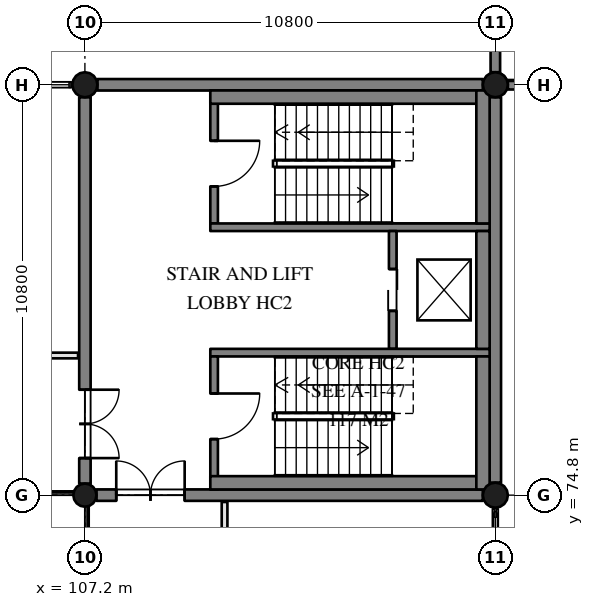
"""IFC4 building model, lengths in metres.
Left out: names, types, materials, properties, quantities, classifications, styles, units other than length and angle.
Written with IfcOpenShell. Run it as: python <this file> out.ifc"""

import sys

from ifc_helpers import new_model, si_unit, direction, frame, frame_2d, origin, origin_2d, place, context, subcontext, project, spatial, rectangle, hollow_circle, extrude, element, fill, save


model = new_model("IFC4")
c1 = context("Model", 3, precision=1e-05, world=origin(), true_north=direction((0.0, 1.0)))
c2 = subcontext(c1, "Body", "Model", "MODEL_VIEW")
j1 = project(units=[si_unit("LENGTHUNIT", "METRE"), si_unit("PLANEANGLEUNIT", "RADIAN")], contexts=[c1])
p1 = place(None, origin())
s1 = spatial("IfcSite", under=j1, at=p1, CompositionType="ELEMENT")
p2 = place(p1, origin())
s2 = spatial("IfcBuilding", under=s1, at=p2, CompositionType="ELEMENT")
p3 = place(p2, frame((0.0, 0.0, 4.8)))
s3 = spatial("IfcBuildingStorey", under=s2, at=p3, CompositionType="ELEMENT", Elevation=4.8)
p4 = place(p3, frame((107.2, 74.8, 0.0), z_axis=(0.0, 0.0, 1.0), x_axis=(1.0, 0.0, 0.0)))
e1 = element("IfcColumn", 1, at=p4, inside=s3, PredefinedType="COLUMN", context=c2, shape_type="SweptSolid", body=[
    extrude(hollow_circle(Radius=0.305, WallThickness=0.025, at=origin_2d()), origin(), (0.0, 0.0, 1.0), 3.9),
])
for number, where, z_axis, x_axis in (
    (2, (107.2, 85.6, 0.0), (0.0, 0.0, 1.0), (1.0, 0.0, 0.0)),
    (3, (118.0, 74.8, 0.0), (0.0, 0.0, 1.0), (1.0, 0.0, 0.0)),
    (4, (118.0, 85.6, 0.0), (0.0, 0.0, 1.0), (1.0, 0.0, 0.0)),
):
    element("IfcColumn", number, at=place(p3, frame(where, z_axis=z_axis, x_axis=x_axis)), inside=s3, PredefinedType="COLUMN", context=c2, shape_type="SweptSolid", body=[
        extrude(hollow_circle(Radius=0.33, WallThickness=0.025, at=origin_2d()), origin(), (0.0, 0.0, 1.0), 3.9),
    ])
p5 = place(p3, frame((107.505, 74.8, 0.0), z_axis=(0.0, 0.0, 1.0), x_axis=(1.0, 0.0, 0.0)))
e5 = element("IfcWall", 5, at=p5, inside=s3, PredefinedType="SOLIDWALL", context=c2, shape_type="SweptSolid", body=[
    extrude(rectangle(XDim=10.165, YDim=0.3, at=frame_2d((5.083, 0.0))), origin(), (0.0, 0.0, 1.0), 3.9),
])
p6 = place(p5, frame((0.52, 0.0, 0.0)))
e6 = element("IfcOpeningElement", 6, at=p6, cuts=e5, PredefinedType="OPENING", context=c2, shape_type="SweptSolid", body=[
    extrude(rectangle(XDim=1.8, YDim=2.1, at=frame_2d((0.9, 1.05))), frame((0.0, 0.16, 0.0), z_axis=(0.0, -1.0, 0.0), x_axis=(1.0, 0.0, 0.0)), (0.0, 0.0, 1.0), 0.32),
])
p7 = place(p3, frame((118.0, 75.13, 0.0), z_axis=(0.0, 0.0, 1.0), x_axis=(0.0, 1.0, 0.0)))
e7 = element("IfcWall", 7, at=p7, inside=s3, PredefinedType="SOLIDWALL", context=c2, shape_type="SweptSolid", body=[
    extrude(rectangle(XDim=10.14, YDim=0.3, at=frame_2d((5.07, 0.0))), origin(), (0.0, 0.0, 1.0), 3.9),
])
p8 = place(p3, frame((117.67, 85.6, 0.0), z_axis=(0.0, 0.0, 1.0), x_axis=(-1.0, 0.0, 0.0)))
e8 = element("IfcWall", 8, at=p8, inside=s3, PredefinedType="SOLIDWALL", context=c2, shape_type="SweptSolid", body=[
    extrude(rectangle(XDim=10.14, YDim=0.3, at=frame_2d((5.07, 0.0))), origin(), (0.0, 0.0, 1.0), 3.9),
])
p9 = place(p3, frame((107.2, 85.27, 0.0), z_axis=(0.0, 0.0, 1.0), x_axis=(0.0, -1.0, 0.0)))
e9 = element("IfcWall", 9, at=p9, inside=s3, PredefinedType="SOLIDWALL", context=c2, shape_type="SweptSolid", body=[
    extrude(rectangle(XDim=10.165, YDim=0.3, at=frame_2d((5.083, 0.0))), origin(), (0.0, 0.0, 1.0), 3.9),
])
p10 = place(p9, frame((7.695, 0.0, 0.0)))
e10 = element("IfcOpeningElement", 10, at=p10, cuts=e9, PredefinedType="OPENING", context=c2, shape_type="SweptSolid", body=[
    extrude(rectangle(XDim=1.8, YDim=2.1, at=frame_2d((0.9, 1.05))), frame((0.0, 0.16, 0.0), z_axis=(0.0, -1.0, 0.0), x_axis=(1.0, 0.0, 0.0)), (0.0, 0.0, 1.0), 0.32),
])
p11 = place(p3, frame((118.33, 85.6, 0.0), z_axis=(0.0, 0.0, 1.0), x_axis=(1.0, 0.0, 0.0)))
e11 = element("IfcWall", 11, at=p11, inside=s3, PredefinedType="SOLIDWALL", context=c2, shape_type="SweptSolid", body=[
    extrude(rectangle(XDim=10.595, YDim=0.25, at=frame_2d((5.297, 0.0))), origin(), (0.0, 0.0, 1.0), 3.9),
])
p12 = place(p3, frame((118.0, 96.0, 0.0), z_axis=(0.0, 0.0, 1.0), x_axis=(0.0, -1.0, 0.0)))
e12 = element("IfcWall", 12, at=p12, inside=s3, PredefinedType="SOLIDWALL", context=c2, shape_type="SweptSolid", body=[
    extrude(rectangle(XDim=10.07, YDim=0.25, at=frame_2d((5.035, 0.0))), origin(), (0.0, 0.0, 1.0), 3.9),
])
p13 = place(p12, frame((4.1, 0.0, 0.0)))
e13 = element("IfcOpeningElement", 13, at=p13, cuts=e12, PredefinedType="OPENING", context=c2, shape_type="SweptSolid", body=[
    extrude(rectangle(XDim=1.8, YDim=2.1, at=frame_2d((0.9, 1.05))), frame((0.0, 0.135, 0.0), z_axis=(0.0, -1.0, 0.0), x_axis=(1.0, 0.0, 0.0)), (0.0, 0.0, 1.0), 0.27),
])
p14 = place(p3, frame((110.6, 85.45, 0.0), z_axis=(0.0, 0.0, 1.0), x_axis=(0.0, -1.0, 0.0)))
e14 = element("IfcWall", 14, at=p14, inside=s3, PredefinedType="SOLIDWALL", context=c2, shape_type="SweptSolid", body=[
    extrude(rectangle(XDim=3.5, YDim=0.2, at=frame_2d((1.75, 0.0))), origin(), (0.0, 0.0, 1.0), 3.6),
])
p15 = place(p14, frame((1.325, 0.0, 0.0)))
e15 = element("IfcOpeningElement", 15, at=p15, cuts=e14, PredefinedType="OPENING", context=c2, shape_type="SweptSolid", body=[
    extrude(rectangle(XDim=1.2, YDim=2.1, at=frame_2d((0.6, 1.05))), frame((0.0, 0.11, 0.0), z_axis=(0.0, -1.0, 0.0), x_axis=(1.0, 0.0, 0.0)), (0.0, 0.0, 1.0), 0.22),
])
p16 = place(p3, frame((110.5, 81.85, 0.0), z_axis=(0.0, 0.0, 1.0), x_axis=(1.0, 0.0, 0.0)))
e16 = element("IfcWall", 16, at=p16, inside=s3, PredefinedType="SOLIDWALL", context=c2, shape_type="SweptSolid", body=[
    extrude(rectangle(XDim=7.35, YDim=0.2, at=frame_2d((3.675, 0.0))), origin(), (0.0, 0.0, 1.0), 3.6),
])
p17 = place(p3, frame((115.3, 81.75, 0.0), z_axis=(0.0, 0.0, 1.0), x_axis=(0.0, -1.0, 0.0)))
e17 = element("IfcWall", 17, at=p17, inside=s3, PredefinedType="SOLIDWALL", context=c2, shape_type="SweptSolid", body=[
    extrude(rectangle(XDim=3.1, YDim=0.2, at=frame_2d((1.55, 0.0))), origin(), (0.0, 0.0, 1.0), 3.6),
])
p18 = place(p17, frame((1.0, 0.0, 0.0)))
e18 = element("IfcOpeningElement", 18, at=p18, cuts=e17, PredefinedType="OPENING", context=c2, shape_type="SweptSolid", body=[
    extrude(rectangle(XDim=1.1, YDim=2.1, at=frame_2d((0.55, 1.05))), frame((0.0, 0.11, 0.0), z_axis=(0.0, -1.0, 0.0), x_axis=(1.0, 0.0, 0.0)), (0.0, 0.0, 1.0), 0.22),
])
p19 = place(p3, frame((110.5, 78.55, 0.0), z_axis=(0.0, 0.0, 1.0), x_axis=(1.0, 0.0, 0.0)))
e19 = element("IfcWall", 19, at=p19, inside=s3, PredefinedType="SOLIDWALL", context=c2, shape_type="SweptSolid", body=[
    extrude(rectangle(XDim=7.35, YDim=0.2, at=frame_2d((3.675, 0.0))), origin(), (0.0, 0.0, 1.0), 3.6),
])
p20 = place(p3, frame((110.6, 78.45, 0.0), z_axis=(0.0, 0.0, 1.0), x_axis=(0.0, -1.0, 0.0)))
e20 = element("IfcWall", 20, at=p20, inside=s3, PredefinedType="SOLIDWALL", context=c2, shape_type="SweptSolid", body=[
    extrude(rectangle(XDim=3.5, YDim=0.2, at=frame_2d((1.75, 0.0))), origin(), (0.0, 0.0, 1.0), 3.6),
])
p21 = place(p20, frame((0.975, 0.0, 0.0)))
e21 = element("IfcOpeningElement", 21, at=p21, cuts=e20, PredefinedType="OPENING", context=c2, shape_type="SweptSolid", body=[
    extrude(rectangle(XDim=1.2, YDim=2.1, at=frame_2d((0.6, 1.05))), frame((0.0, 0.11, 0.0), z_axis=(0.0, -1.0, 0.0), x_axis=(1.0, 0.0, 0.0)), (0.0, 0.0, 1.0), 0.22),
])
p22 = place(p3, frame((110.5, 85.275, -0.4), z_axis=(0.0, 0.0, 1.0), x_axis=(1.0, 0.0, 0.0)))
e22 = element("IfcWall", 22, at=p22, inside=s3, PredefinedType="SOLIDWALL", context=c2, shape_type="SweptSolid", body=[
    extrude(rectangle(XDim=7.35, YDim=0.35, at=frame_2d((3.675, 0.0))), origin(), (0.0, 0.0, 1.0), 4.0),
])
p23 = place(p3, frame((117.675, 85.45, -0.4), z_axis=(0.0, 0.0, 1.0), x_axis=(0.0, -1.0, 0.0)))
e23 = element("IfcWall", 23, at=p23, inside=s3, PredefinedType="SOLIDWALL", context=c2, shape_type="SweptSolid", body=[
    extrude(rectangle(XDim=3.5, YDim=0.35, at=frame_2d((1.75, 0.0))), origin(), (0.0, 0.0, 1.0), 4.0),
])
p24 = place(p3, frame((110.5, 75.125, -0.4), z_axis=(0.0, 0.0, 1.0), x_axis=(1.0, 0.0, 0.0)))
e24 = element("IfcWall", 24, at=p24, inside=s3, PredefinedType="SOLIDWALL", context=c2, shape_type="SweptSolid", body=[
    extrude(rectangle(XDim=7.35, YDim=0.35, at=frame_2d((3.675, 0.0))), origin(), (0.0, 0.0, 1.0), 4.0),
])
p25 = place(p3, frame((117.675, 78.45, -0.4), z_axis=(0.0, 0.0, 1.0), x_axis=(0.0, -1.0, 0.0)))
e25 = element("IfcWall", 25, at=p25, inside=s3, PredefinedType="SOLIDWALL", context=c2, shape_type="SweptSolid", body=[
    extrude(rectangle(XDim=3.5, YDim=0.35, at=frame_2d((1.75, 0.0))), origin(), (0.0, 0.0, 1.0), 4.0),
])
p26 = place(p3, frame((117.675, 81.75, -0.4), z_axis=(0.0, 0.0, 1.0), x_axis=(0.0, -1.0, 0.0)))
e26 = element("IfcWall", 26, at=p26, inside=s3, PredefinedType="SOLIDWALL", context=c2, shape_type="SweptSolid", body=[
    extrude(rectangle(XDim=3.1, YDim=0.35, at=frame_2d((1.55, 0.0))), origin(), (0.0, 0.0, 1.0), 4.0),
])
p27 = place(p3, frame((96.4, 78.475, 0.0), z_axis=(0.0, 0.0, 1.0), x_axis=(1.0, 0.0, 0.0)))
e27 = element("IfcWall", 27, at=p27, inside=s3, PredefinedType="PARTITIONING", context=c2, shape_type="SweptSolid", body=[
    extrude(rectangle(XDim=10.62, YDim=0.15, at=frame_2d((5.31, 0.0))), origin(), (0.0, 0.0, 1.0), 3.1),
])
p28 = place(p27, frame((4.81, 0.0, 0.0)))
e28 = element("IfcOpeningElement", 28, at=p28, cuts=e27, PredefinedType="OPENING", context=c2, shape_type="SweptSolid", body=[
    extrude(rectangle(XDim=1.0, YDim=2.1, at=frame_2d((0.5, 1.05))), frame((0.0, 0.085, 0.0), z_axis=(0.0, -1.0, 0.0), x_axis=(1.0, 0.0, 0.0)), (0.0, 0.0, 1.0), 0.17),
])
p29 = place(p3, frame((110.875, 64.0, 0.0), z_axis=(0.0, 0.0, 1.0), x_axis=(0.0, 1.0, 0.0)))
e29 = element("IfcWall", 29, at=p29, inside=s3, PredefinedType="PARTITIONING", context=c2, shape_type="SweptSolid", body=[
    extrude(rectangle(XDim=10.62, YDim=0.15, at=frame_2d((5.31, 0.0))), origin(), (0.0, 0.0, 1.0), 7.574),
])
p30 = place(p29, frame((4.81, 0.0, 0.0)))
e30 = element("IfcOpeningElement", 30, at=p30, cuts=e29, PredefinedType="OPENING", context=c2, shape_type="SweptSolid", body=[
    extrude(rectangle(XDim=1.0, YDim=2.1, at=frame_2d((0.5, 1.05))), frame((0.0, 0.085, 0.0), z_axis=(0.0, -1.0, 0.0), x_axis=(1.0, 0.0, 0.0)), (0.0, 0.0, 1.0), 0.17),
])
p31 = place(p18, frame((1.1, 0.0, 0.0), z_axis=(0.0, 0.0, 1.0), x_axis=(-1.0, 0.0, 0.0)))
e31 = element("IfcDoor", 31, at=p31, inside=s3, OperationType="DOUBLE_DOOR_SLIDING", PredefinedType="DOOR", context=c2, shape_type="SweptSolid", body=[
    extrude(rectangle(XDim=1.1, YDim=2.1, at=frame_2d((0.55, 1.05))), frame((0.0, 0.025, 0.0), z_axis=(0.0, -1.0, 0.0), x_axis=(1.0, 0.0, 0.0)), (0.0, 0.0, 1.0), 0.05),
])
fill(e18, e31)
p32 = place(p15, frame((1.2, 0.0, 0.0), z_axis=(0.0, 0.0, 1.0), x_axis=(-1.0, 0.0, 0.0)))
e32 = element("IfcDoor", 32, at=p32, inside=s3, OperationType="SINGLE_SWING_LEFT", PredefinedType="DOOR", context=c2, shape_type="SweptSolid", body=[
    extrude(rectangle(XDim=1.2, YDim=2.1, at=frame_2d((0.6, 1.05))), frame((0.0, 0.025, 0.0), z_axis=(0.0, -1.0, 0.0), x_axis=(1.0, 0.0, 0.0)), (0.0, 0.0, 1.0), 0.05),
])
fill(e15, e32)
p33 = place(p21, frame((1.2, 0.0, 0.0), z_axis=(0.0, 0.0, 1.0), x_axis=(-1.0, 0.0, 0.0)))
e33 = element("IfcDoor", 33, at=p33, inside=s3, OperationType="SINGLE_SWING_RIGHT", PredefinedType="DOOR", context=c2, shape_type="SweptSolid", body=[
    extrude(rectangle(XDim=1.2, YDim=2.1, at=frame_2d((0.6, 1.05))), frame((0.0, 0.025, 0.0), z_axis=(0.0, -1.0, 0.0), x_axis=(1.0, 0.0, 0.0)), (0.0, 0.0, 1.0), 0.05),
])
fill(e21, e33)
p34 = place(p10, frame((1.8, 0.0, 0.0), z_axis=(0.0, 0.0, 1.0), x_axis=(-1.0, 0.0, 0.0)))
e34 = element("IfcDoor", 34, at=p34, inside=s3, OperationType="DOUBLE_DOOR_DOUBLE_SWING", PredefinedType="DOOR", context=c2, shape_type="SweptSolid", body=[
    extrude(rectangle(XDim=1.8, YDim=2.1, at=frame_2d((0.9, 1.05))), frame((0.0, 0.025, 0.0), z_axis=(0.0, -1.0, 0.0), x_axis=(1.0, 0.0, 0.0)), (0.0, 0.0, 1.0), 0.05),
])
fill(e10, e34)
p35 = place(p6, frame((1.8, 0.0, 0.0), z_axis=(0.0, 0.0, 1.0), x_axis=(-1.0, 0.0, 0.0)))
e35 = element("IfcDoor", 35, at=p35, inside=s3, OperationType="DOUBLE_DOOR_DOUBLE_SWING", PredefinedType="DOOR", context=c2, shape_type="SweptSolid", body=[
    extrude(rectangle(XDim=1.8, YDim=2.1, at=frame_2d((0.9, 1.05))), frame((0.0, 0.025, 0.0), z_axis=(0.0, -1.0, 0.0), x_axis=(1.0, 0.0, 0.0)), (0.0, 0.0, 1.0), 0.05),
])
fill(e6, e35)
save(model, sys.argv[1])
